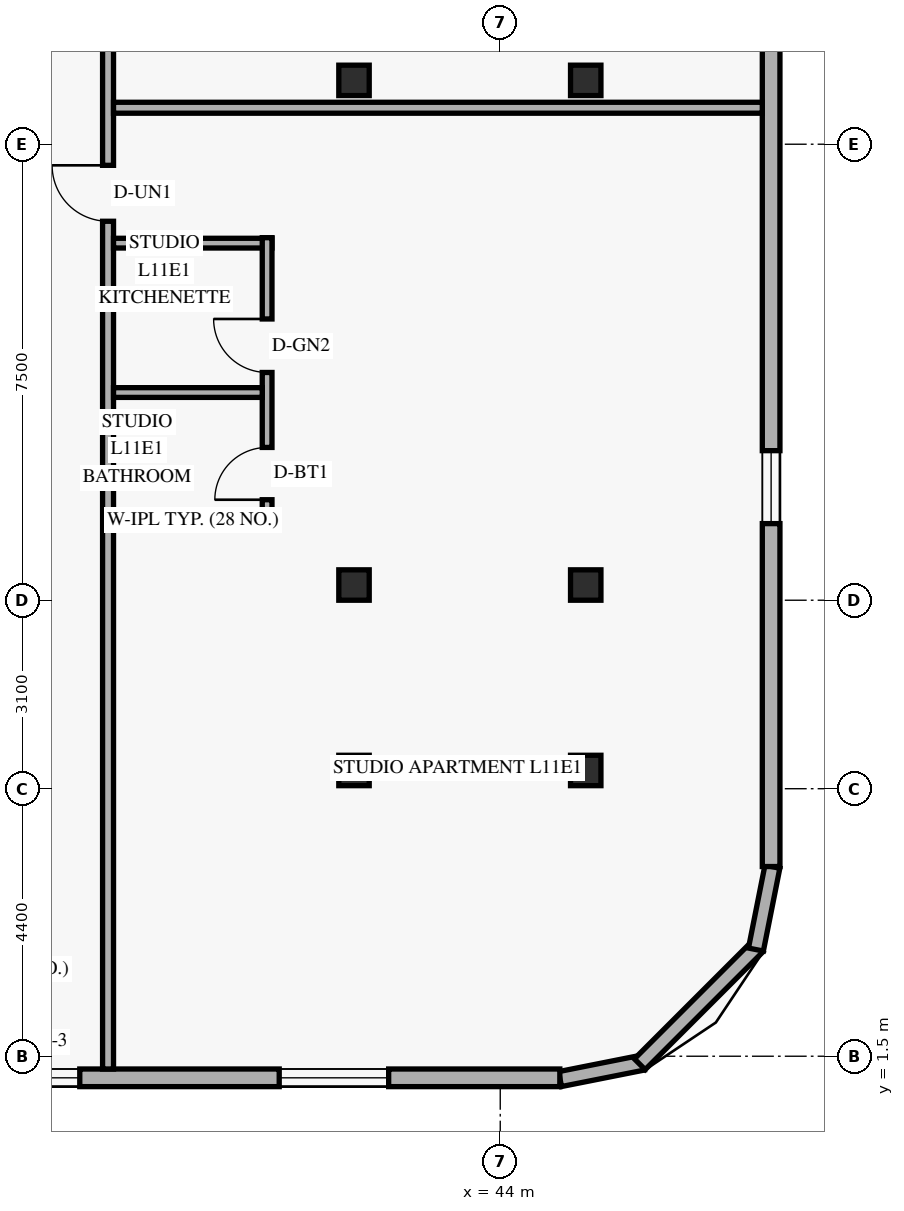
"""IFC4 building model, lengths in metres.
Left out: names, types, materials, properties, quantities, classifications, styles, units other than length and angle.
Written with IfcOpenShell. Run it as: python <this file> out.ifc"""

import sys

from ifc_helpers import new_model, si_unit, direction, frame, frame_2d, origin, origin_2d, place, context, subcontext, project, spatial, rectangle, hollow_rectangle, extrude, element, fill, save


model = new_model("IFC4")
c1 = context("Model", 3, precision=1e-05, world=origin(), true_north=direction((0.0, 1.0)))
c2 = subcontext(c1, "Body", "Model", "MODEL_VIEW")
j1 = project(units=[si_unit("LENGTHUNIT", "METRE"), si_unit("PLANEANGLEUNIT", "RADIAN")], contexts=[c1])
p1 = place(None, origin())
s1 = spatial("IfcSite", under=j1, at=p1, CompositionType="ELEMENT")
p2 = place(p1, origin())
s2 = spatial("IfcBuilding", under=s1, at=p2, CompositionType="ELEMENT")
p3 = place(p2, frame((0.0, 0.0, 45.6)))
s3 = spatial("IfcBuildingStorey", under=s2, at=p3, CompositionType="ELEMENT", Elevation=45.6)
for number, where, z_axis, x_axis in (
    (1, (41.532, 6.2, 0.0), (0.035, 0.0, 0.999), (0.0, 1.0, 0.0)),
    (2, (41.532, 9.25, 0.0), (0.035, 0.0, 0.999), (0.0, 1.0, 0.0)),
    (3, (41.532, 17.55, 0.0), (0.035, 0.0, 0.999), (0.0, 1.0, 0.0)),
):
    element("IfcColumn", number, at=place(p3, frame(where, z_axis=z_axis, x_axis=x_axis)), inside=s3, PredefinedType="COLUMN", context=c2, shape_type="SweptSolid", body=[
        extrude(hollow_rectangle(XDim=0.5, YDim=0.5, WallThickness=0.022, at=origin_2d()), origin(), (0.0, 0.0, 1.0), 3.602),
    ])
for number, where, z_axis, x_axis in (
    (4, (45.302, 6.2, 0.0), (0.058, 0.0, 0.998), (0.0, 1.0, 0.0)),
    (5, (45.302, 9.25, 0.0), (0.058, 0.0, 0.998), (0.0, 1.0, 0.0)),
    (6, (45.302, 17.55, 0.0), (0.058, 0.0, 0.998), (0.0, 1.0, 0.0)),
):
    element("IfcColumn", number, at=place(p3, frame(where, z_axis=z_axis, x_axis=x_axis)), inside=s3, PredefinedType="COLUMN", context=c2, shape_type="SweptSolid", body=[
        extrude(hollow_rectangle(XDim=0.5, YDim=0.5, WallThickness=0.022, at=origin_2d()), origin(), (0.0, 0.0, 1.0), 3.606),
    ])
p4 = place(p3, frame((44.983, 1.124, 0.0), z_axis=(0.0, 0.0, 1.0), x_axis=(0.980809899341, 0.19496651342, 0.0)))
e7 = element("IfcWall", 7, at=p4, inside=s3, PredefinedType="SOLIDWALL", context=c2, shape_type="SweptSolid", body=[
    extrude(rectangle(XDim=1.389, YDim=0.25, at=frame_2d((0.694, 0.0))), origin(), (0.0, 0.0, 1.0), 3.36),
])
p5 = place(p3, frame((46.295, 1.368, 0.0), z_axis=(0.0, 0.0, 1.0), x_axis=(0.707106781187, 0.707106781187, 0.0)))
e8 = element("IfcWall", 8, at=p5, inside=s3, PredefinedType="SOLIDWALL", context=c2, shape_type="SweptSolid", body=[
    extrude(rectangle(XDim=2.739, YDim=0.25, at=frame_2d((1.37, 0.0))), origin(), (0.0, 0.0, 1.0), 3.36),
])
p6 = place(p3, frame((48.205, 3.254, 0.0), z_axis=(0.0, 0.0, 1.0), x_axis=(0.19496651342, 0.980809899341, 0.0)))
e9 = element("IfcWall", 9, at=p6, inside=s3, PredefinedType="SOLIDWALL", context=c2, shape_type="SweptSolid", body=[
    extrude(rectangle(XDim=1.389, YDim=0.25, at=frame_2d((0.694, 0.0))), origin(), (0.0, 0.0, 1.0), 3.36),
])
p7 = place(p3, frame((5.42, 1.145, 0.0), z_axis=(0.0, 0.0, 1.0), x_axis=(1.0, 0.0, 0.0)))
e10 = element("IfcWall", 10, at=p7, inside=s3, PredefinedType="SOLIDWALL", context=c2, shape_type="SweptSolid", body=[
    extrude(rectangle(XDim=39.56, YDim=0.29, at=frame_2d((19.78, 0.0))), origin(), (0.0, 0.0, 1.0), 3.36),
])
p8 = place(p7, frame((2.54, 0.0, 0.85)))
e11 = element("IfcOpeningElement", 11, at=p8, cuts=e10, PredefinedType="OPENING", context=c2, shape_type="SweptSolid", body=[
    extrude(rectangle(XDim=1.8, YDim=1.6, at=frame_2d((0.9, 0.8))), frame((0.0, 0.155, 0.0), z_axis=(0.0, -1.0, 0.0), x_axis=(1.0, 0.0, 0.0)), (0.0, 0.0, 1.0), 0.31),
])
p9 = place(p7, frame((7.18, 0.0, 0.85)))
e12 = element("IfcOpeningElement", 12, at=p9, cuts=e10, PredefinedType="OPENING", context=c2, shape_type="SweptSolid", body=[
    extrude(rectangle(XDim=1.2, YDim=1.5, at=frame_2d((0.6, 0.75))), frame((0.0, 0.155, 0.0), z_axis=(0.0, -1.0, 0.0), x_axis=(1.0, 0.0, 0.0)), (0.0, 0.0, 1.0), 0.31),
])
p10 = place(p7, frame((12.257, 0.0, 0.85)))
e13 = element("IfcOpeningElement", 13, at=p10, cuts=e10, PredefinedType="OPENING", context=c2, shape_type="SweptSolid", body=[
    extrude(rectangle(XDim=1.8, YDim=1.6, at=frame_2d((0.9, 0.8))), frame((0.0, 0.155, 0.0), z_axis=(0.0, -1.0, 0.0), x_axis=(1.0, 0.0, 0.0)), (0.0, 0.0, 1.0), 0.31),
])
p11 = place(p7, frame((20.847, 0.0, 0.85)))
e14 = element("IfcOpeningElement", 14, at=p11, cuts=e10, PredefinedType="OPENING", context=c2, shape_type="SweptSolid", body=[
    extrude(rectangle(XDim=1.8, YDim=1.6, at=frame_2d((0.9, 0.8))), frame((0.0, 0.155, 0.0), z_axis=(0.0, -1.0, 0.0), x_axis=(1.0, 0.0, 0.0)), (0.0, 0.0, 1.0), 0.31),
])
p12 = place(p7, frame((27.03, 0.0, 0.85)))
e15 = element("IfcOpeningElement", 15, at=p12, cuts=e10, PredefinedType="OPENING", context=c2, shape_type="SweptSolid", body=[
    extrude(rectangle(XDim=1.8, YDim=1.6, at=frame_2d((0.9, 0.8))), frame((0.0, 0.155, 0.0), z_axis=(0.0, -1.0, 0.0), x_axis=(1.0, 0.0, 0.0)), (0.0, 0.0, 1.0), 0.31),
])
p13 = place(p7, frame((30.465, 0.0, 0.85)))
e16 = element("IfcOpeningElement", 16, at=p13, cuts=e10, PredefinedType="OPENING", context=c2, shape_type="SweptSolid", body=[
    extrude(rectangle(XDim=1.2, YDim=1.5, at=frame_2d((0.6, 0.75))), frame((0.0, 0.155, 0.0), z_axis=(0.0, -1.0, 0.0), x_axis=(1.0, 0.0, 0.0)), (0.0, 0.0, 1.0), 0.31),
])
p14 = place(p7, frame((34.945, 0.0, 0.85)))
e17 = element("IfcOpeningElement", 17, at=p14, cuts=e10, PredefinedType="OPENING", context=c2, shape_type="SweptSolid", body=[
    extrude(rectangle(XDim=1.8, YDim=1.6, at=frame_2d((0.9, 0.8))), frame((0.0, 0.155, 0.0), z_axis=(0.0, -1.0, 0.0), x_axis=(1.0, 0.0, 0.0)), (0.0, 0.0, 1.0), 0.31),
])
p15 = place(p3, frame((48.455, 4.62, 0.0), z_axis=(0.0, 0.0, 1.0), x_axis=(0.0, 1.0, 0.0)))
e18 = element("IfcWall", 18, at=p15, inside=s3, PredefinedType="SOLIDWALL", context=c2, shape_type="SweptSolid", body=[
    extrude(rectangle(XDim=38.76, YDim=0.29, at=frame_2d((19.38, 0.0))), origin(), (0.0, 0.0, 1.0), 3.36),
])
p16 = place(p15, frame((5.64, 0.0, 0.85)))
e19 = element("IfcOpeningElement", 19, at=p16, cuts=e18, PredefinedType="OPENING", context=c2, shape_type="SweptSolid", body=[
    extrude(rectangle(XDim=1.2, YDim=1.5, at=frame_2d((0.6, 0.75))), frame((0.0, 0.155, 0.0), z_axis=(0.0, -1.0, 0.0), x_axis=(1.0, 0.0, 0.0)), (0.0, 0.0, 1.0), 0.31),
])
p17 = place(p15, frame((13.784, 0.0, 0.85)))
e20 = element("IfcOpeningElement", 20, at=p17, cuts=e18, PredefinedType="OPENING", context=c2, shape_type="SweptSolid", body=[
    extrude(rectangle(XDim=1.2, YDim=1.5, at=frame_2d((0.6, 0.75))), frame((0.0, 0.155, 0.0), z_axis=(0.0, -1.0, 0.0), x_axis=(1.0, 0.0, 0.0)), (0.0, 0.0, 1.0), 0.31),
])
p18 = place(p15, frame((19.359, 0.0, 0.85)))
e21 = element("IfcOpeningElement", 21, at=p18, cuts=e18, PredefinedType="OPENING", context=c2, shape_type="SweptSolid", body=[
    extrude(rectangle(XDim=1.2, YDim=1.5, at=frame_2d((0.6, 0.75))), frame((0.0, 0.155, 0.0), z_axis=(0.0, -1.0, 0.0), x_axis=(1.0, 0.0, 0.0)), (0.0, 0.0, 1.0), 0.31),
])
p19 = place(p15, frame((25.275, 0.0, 0.85)))
e22 = element("IfcOpeningElement", 22, at=p19, cuts=e18, PredefinedType="OPENING", context=c2, shape_type="SweptSolid", body=[
    extrude(rectangle(XDim=1.2, YDim=1.5, at=frame_2d((0.6, 0.75))), frame((0.0, 0.155, 0.0), z_axis=(0.0, -1.0, 0.0), x_axis=(1.0, 0.0, 0.0)), (0.0, 0.0, 1.0), 0.31),
])
p20 = place(p15, frame((32.58, 0.0, 0.85)))
e23 = element("IfcOpeningElement", 23, at=p20, cuts=e18, PredefinedType="OPENING", context=c2, shape_type="SweptSolid", body=[
    extrude(rectangle(XDim=1.2, YDim=1.5, at=frame_2d((0.6, 0.75))), frame((0.0, 0.155, 0.0), z_axis=(0.0, -1.0, 0.0), x_axis=(1.0, 0.0, 0.0)), (0.0, 0.0, 1.0), 0.31),
])
p21 = place(p3, frame((37.55, 1.29, 0.0), z_axis=(0.0, 0.0, 1.0), x_axis=(0.0, 1.0, 0.0)))
e24 = element("IfcWall", 24, at=p21, inside=s3, PredefinedType="STANDARD", context=c2, shape_type="SweptSolid", body=[
    extrude(rectangle(XDim=45.42, YDim=0.18, at=frame_2d((22.71, 0.0))), origin(), (0.0, 0.0, 1.0), 2.649),
])
p22 = place(p21, frame((13.943, 0.0, 0.0)))
e25 = element("IfcOpeningElement", 25, at=p22, cuts=e24, PredefinedType="OPENING", context=c2, shape_type="SweptSolid", body=[
    extrude(rectangle(XDim=0.92, YDim=2.15, at=frame_2d((0.46, 1.075))), frame((0.0, 0.1, 0.0), z_axis=(0.0, -1.0, 0.0), x_axis=(1.0, 0.0, 0.0)), (0.0, 0.0, 1.0), 0.2),
])
p23 = place(p21, frame((20.953, 0.0, 0.0)))
e26 = element("IfcOpeningElement", 26, at=p23, cuts=e24, PredefinedType="OPENING", context=c2, shape_type="SweptSolid", body=[
    extrude(rectangle(XDim=0.92, YDim=2.15, at=frame_2d((0.46, 1.075))), frame((0.0, 0.1, 0.0), z_axis=(0.0, -1.0, 0.0), x_axis=(1.0, 0.0, 0.0)), (0.0, 0.0, 1.0), 0.2),
])
p24 = place(p21, frame((36.635, 0.0, 0.0)))
e27 = element("IfcOpeningElement", 27, at=p24, cuts=e24, PredefinedType="OPENING", context=c2, shape_type="SweptSolid", body=[
    extrude(rectangle(XDim=0.92, YDim=2.15, at=frame_2d((0.46, 1.075))), frame((0.0, 0.1, 0.0), z_axis=(0.0, -1.0, 0.0), x_axis=(1.0, 0.0, 0.0)), (0.0, 0.0, 1.0), 0.2),
])
for number, where, z_axis, x_axis in (
    (28, (37.64, 10.323, 0.0), (0.0, 0.0, 1.0), (1.0, 0.0, 0.0)),
    (29, (37.64, 14.873, 0.0), (0.0, 0.0, 1.0), (1.0, 0.0, 0.0)),
):
    element("IfcWall", number, at=place(p3, frame(where, z_axis=z_axis, x_axis=x_axis)), inside=s3, PredefinedType="PLUMBINGWALL", context=c2, shape_type="SweptSolid", body=[
        extrude(rectangle(XDim=2.606, YDim=0.16, at=frame_2d((1.303, 0.0))), origin(), (0.0, 0.0, 1.0), 3.36),
    ])
p25 = place(p3, frame((40.166, 10.233, 0.0), z_axis=(0.0, 0.0, 1.0), x_axis=(0.0, 1.0, 0.0)))
e30 = element("IfcWall", 30, at=p25, inside=s3, PredefinedType="PLUMBINGWALL", context=c2, shape_type="SweptSolid", body=[
    extrude(rectangle(XDim=4.73, YDim=0.16, at=frame_2d((2.365, 0.0))), origin(), (0.0, 0.0, 1.0), 2.932),
])
p26 = place(p25, frame((0.42, 0.0, 0.0)))
e31 = element("IfcOpeningElement", 31, at=p26, cuts=e30, PredefinedType="OPENING", context=c2, shape_type="SweptSolid", body=[
    extrude(rectangle(XDim=0.86, YDim=2.12, at=frame_2d((0.43, 1.06))), frame((0.0, 0.09, 0.0), z_axis=(0.0, -1.0, 0.0), x_axis=(1.0, 0.0, 0.0)), (0.0, 0.0, 1.0), 0.18),
])
p27 = place(p25, frame((2.513, 0.0, 0.0)))
e32 = element("IfcOpeningElement", 32, at=p27, cuts=e30, PredefinedType="OPENING", context=c2, shape_type="SweptSolid", body=[
    extrude(rectangle(XDim=0.88, YDim=2.12, at=frame_2d((0.44, 1.06))), frame((0.0, 0.09, 0.0), z_axis=(0.0, -1.0, 0.0), x_axis=(1.0, 0.0, 0.0)), (0.0, 0.0, 1.0), 0.18),
])
p28 = place(p3, frame((37.64, 12.416, 0.0), z_axis=(0.0, 0.0, 1.0), x_axis=(1.0, 0.0, 0.0)))
e33 = element("IfcWall", 33, at=p28, inside=s3, PredefinedType="PLUMBINGWALL", context=c2, shape_type="SweptSolid", body=[
    extrude(rectangle(XDim=2.446, YDim=0.16, at=frame_2d((1.223, 0.0))), origin(), (0.0, 0.0, 1.0), 3.36),
])
p29 = place(p3, frame((37.64, 17.1, 0.0), z_axis=(0.0, 0.0, 1.0), x_axis=(1.0, 0.0, 0.0)))
e34 = element("IfcWall", 34, at=p29, inside=s3, PredefinedType="PARTITIONING", context=c2, shape_type="SweptSolid", body=[
    extrude(rectangle(XDim=10.67, YDim=0.18, at=frame_2d((5.335, 0.0))), origin(), (0.0, 0.0, 1.0), 2.649),
])
p30 = place(p13, origin())
e35 = element("IfcWindow", 35, at=p30, inside=s3, PartitioningType="SINGLE_PANEL", PredefinedType="WINDOW", context=c2, shape_type="SweptSolid", body=[
    extrude(rectangle(XDim=1.2, YDim=1.5, at=frame_2d((0.6, 0.75))), frame((0.0, 0.03, 0.0), z_axis=(0.0, -1.0, 0.0), x_axis=(1.0, 0.0, 0.0)), (0.0, 0.0, 1.0), 0.06),
])
fill(e16, e35)
p31 = place(p14, origin())
e36 = element("IfcWindow", 36, at=p31, inside=s3, PartitioningType="SINGLE_PANEL", PredefinedType="WINDOW", context=c2, shape_type="SweptSolid", body=[
    extrude(rectangle(XDim=1.8, YDim=1.6, at=frame_2d((0.9, 0.8))), frame((0.0, 0.03, 0.0), z_axis=(0.0, -1.0, 0.0), x_axis=(1.0, 0.0, 0.0)), (0.0, 0.0, 1.0), 0.06),
])
fill(e17, e36)
p32 = place(p16, origin())
e37 = element("IfcWindow", 37, at=p32, inside=s3, PartitioningType="SINGLE_PANEL", PredefinedType="WINDOW", context=c2, shape_type="SweptSolid", body=[
    extrude(rectangle(XDim=1.2, YDim=1.5, at=frame_2d((0.6, 0.75))), frame((0.0, 0.03, 0.0), z_axis=(0.0, -1.0, 0.0), x_axis=(1.0, 0.0, 0.0)), (0.0, 0.0, 1.0), 0.06),
])
fill(e19, e37)
p33 = place(p22, origin())
e38 = element("IfcDoor", 38, at=p33, inside=s3, OperationType="SINGLE_SWING_RIGHT", PredefinedType="DOOR", context=c2, shape_type="SweptSolid", body=[
    extrude(rectangle(XDim=0.92, YDim=2.15, at=frame_2d((0.46, 1.075))), frame((0.0, 0.025, 0.0), z_axis=(0.0, -1.0, 0.0), x_axis=(1.0, 0.0, 0.0)), (0.0, 0.0, 1.0), 0.05),
])
fill(e25, e38)
p34 = place(p26, origin())
e39 = element("IfcDoor", 39, at=p34, inside=s3, OperationType="SINGLE_SWING_LEFT", PredefinedType="DOOR", context=c2, shape_type="SweptSolid", body=[
    extrude(rectangle(XDim=0.86, YDim=2.12, at=frame_2d((0.43, 1.06))), frame((0.0, 0.025, 0.0), z_axis=(0.0, -1.0, 0.0), x_axis=(1.0, 0.0, 0.0)), (0.0, 0.0, 1.0), 0.05),
])
fill(e31, e39)
p35 = place(p27, origin())
e40 = element("IfcDoor", 40, at=p35, inside=s3, OperationType="SINGLE_SWING_RIGHT", PredefinedType="DOOR", context=c2, shape_type="SweptSolid", body=[
    extrude(rectangle(XDim=0.88, YDim=2.12, at=frame_2d((0.44, 1.06))), frame((0.0, 0.025, 0.0), z_axis=(0.0, -1.0, 0.0), x_axis=(1.0, 0.0, 0.0)), (0.0, 0.0, 1.0), 0.05),
])
fill(e32, e40)
save(model, sys.argv[1])
